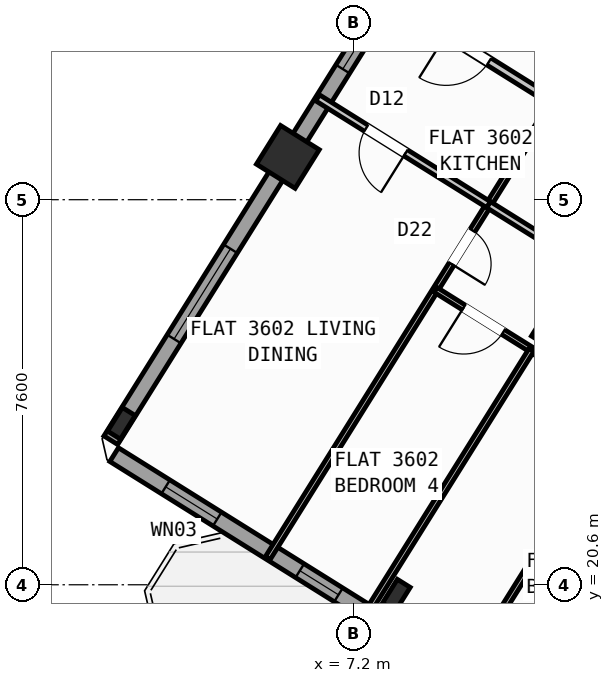
"""IFC4 building model, lengths in metres.
Left out: names, types, materials, properties, quantities, classifications, styles, units other than length and angle.
Written with IfcOpenShell. Run it as: python <this file> out.ifc"""

import sys

from ifc_helpers import new_model, si_unit, direction, frame, frame_2d, origin, origin_2d, place, context, subcontext, project, spatial, rectangle, hollow_rectangle, i_section, extrude, source, transform, mapped, element, fill, save


model = new_model("IFC4")
c1 = context("Model", 3, precision=1e-05, world=origin(), true_north=direction((0.0, 1.0)))
c2 = subcontext(c1, "Body", "Model", "MODEL_VIEW")
j1 = project(units=[si_unit("LENGTHUNIT", "METRE"), si_unit("PLANEANGLEUNIT", "RADIAN")], contexts=[c1])
p1 = place(None, origin())
s1 = spatial("IfcSite", under=j1, at=p1, CompositionType="ELEMENT")
p2 = place(p1, origin())
s2 = spatial("IfcBuilding", under=s1, at=p2, CompositionType="ELEMENT")
p3 = place(p2, frame((0.0, 0.0, 144.3)))
s3 = spatial("IfcBuildingStorey", under=s2, at=p3, CompositionType="ELEMENT", Elevation=144.3)
m1 = source(origin(), c2, "Body", "SweptSolid", [
    extrude(hollow_rectangle(XDim=0.9, YDim=0.9, WallThickness=0.036, at=origin_2d()), origin(), (0.0, 0.0, 1.0), 3.6),
])
p4 = place(p3, frame((11.336, 25.653, 0.0), z_axis=(0.0, 0.0, 1.0), x_axis=(-0.848048096156, 0.529919264233, 0.0)))
e1 = element("IfcColumn", 1, at=p4, inside=s3, PredefinedType="COLUMN", context=c2, shape_type="MappedRepresentation", body=[
    mapped(m1, transform((0.0, 0.0, 0.0), scale=1.0)),
])
m2 = source(origin(), c2, "Body", "SweptSolid", [
    extrude(i_section(OverallWidth=0.3, OverallDepth=0.55, WebThickness=0.015, FlangeThickness=0.029, at=origin_2d()), origin(), (0.0, 0.0, 1.0), 3.6),
])
p5 = place(p3, frame((8.051, 20.395, 0.0), z_axis=(0.0, 0.0, 1.0), x_axis=(-0.848048096156, 0.529919264233, 0.0)))
e2 = element("IfcColumn", 2, at=p5, inside=s3, PredefinedType="COLUMN", context=c2, shape_type="MappedRepresentation", body=[
    mapped(m2, transform((0.0, 0.0, 0.0), scale=1.0)),
])
p6 = place(p3, frame((5.909, 29.044, 0.0), z_axis=(0.0, 0.0, 1.0), x_axis=(-0.848048096156, 0.529919264233, 0.0)))
e3 = element("IfcColumn", 3, at=p6, inside=s3, PredefinedType="COLUMN", context=c2, shape_type="MappedRepresentation", body=[
    mapped(m1, transform((0.0, 0.0, 0.0), scale=1.0)),
])
p7 = place(p3, frame((2.623, 23.786, 0.0), z_axis=(0.0, 0.0, 1.0), x_axis=(-0.848048096156, 0.529919264233, 0.0)))
e4 = element("IfcColumn", 4, at=p7, inside=s3, PredefinedType="COLUMN", context=c2, shape_type="MappedRepresentation", body=[
    mapped(m2, transform((0.0, 0.0, 0.0), scale=1.0)),
])
p8 = place(p3, frame((29.268, 6.429, 0.0), z_axis=(0.0, 0.0, 1.0), x_axis=(-0.848049971435, 0.529916263149, 0.0)))
e5 = element("IfcWall", 5, at=p8, inside=s3, PredefinedType="STANDARD", context=c2, shape_type="SweptSolid", body=[
    extrude(rectangle(XDim=31.588, YDim=0.32, at=frame_2d((15.794, 0.0))), origin(), (0.0, 0.0, 1.0), 3.35),
])
p9 = place(p8, frame((16.362, 0.0, 0.0)))
e6 = element("IfcOpeningElement", 6, at=p9, cuts=e5, PredefinedType="OPENING", context=c2, shape_type="SweptSolid", body=[
    extrude(rectangle(XDim=1.2, YDim=2.15, at=frame_2d((0.6, 1.075))), frame((0.0, 0.17, 0.0), z_axis=(0.0, -1.0, 0.0), x_axis=(1.0, 0.0, 0.0)), (0.0, 0.0, 1.0), 0.34),
])
p10 = place(p8, frame((2.989, 0.0, 0.8)))
e7 = element("IfcOpeningElement", 7, at=p10, cuts=e5, PredefinedType="OPENING", context=c2, shape_type="SweptSolid", body=[
    extrude(rectangle(XDim=2.1, YDim=1.55, at=frame_2d((1.05, 0.775))), frame((0.0, 0.17, 0.0), z_axis=(0.0, -1.0, 0.0), x_axis=(1.0, 0.0, 0.0)), (0.0, 0.0, 1.0), 0.34),
])
p11 = place(p8, frame((8.359, 0.0, 0.8)))
e8 = element("IfcOpeningElement", 8, at=p11, cuts=e5, PredefinedType="OPENING", context=c2, shape_type="SweptSolid", body=[
    extrude(rectangle(XDim=2.1, YDim=1.55, at=frame_2d((1.05, 0.775))), frame((0.0, 0.17, 0.0), z_axis=(0.0, -1.0, 0.0), x_axis=(1.0, 0.0, 0.0)), (0.0, 0.0, 1.0), 0.34),
])
p12 = place(p8, frame((13.284, 0.0, 0.95)))
e9 = element("IfcOpeningElement", 9, at=p12, cuts=e5, PredefinedType="OPENING", context=c2, shape_type="SweptSolid", body=[
    extrude(rectangle(XDim=1.2, YDim=1.4, at=frame_2d((0.6, 0.7))), frame((0.0, 0.17, 0.0), z_axis=(0.0, -1.0, 0.0), x_axis=(1.0, 0.0, 0.0)), (0.0, 0.0, 1.0), 0.34),
])
p13 = place(p8, frame((29.188, 0.0, 0.95)))
e10 = element("IfcOpeningElement", 10, at=p13, cuts=e5, PredefinedType="OPENING", context=c2, shape_type="SweptSolid", body=[
    extrude(rectangle(XDim=1.2, YDim=1.4, at=frame_2d((0.6, 0.7))), frame((0.0, 0.17, 0.0), z_axis=(0.0, -1.0, 0.0), x_axis=(1.0, 0.0, 0.0)), (0.0, 0.0, 1.0), 0.34),
])
p14 = place(p8, frame((19.674, 0.0, 1.0)))
e11 = element("IfcOpeningElement", 11, at=p14, cuts=e5, PredefinedType="OPENING", context=c2, shape_type="SweptSolid", body=[
    extrude(rectangle(XDim=0.9, YDim=1.25, at=frame_2d((0.45, 0.625))), frame((0.0, 0.17, 0.0), z_axis=(0.0, -1.0, 0.0), x_axis=(1.0, 0.0, 0.0)), (0.0, 0.0, 1.0), 0.34),
])
p15 = place(p8, frame((21.896, 0.0, 1.0)))
e12 = element("IfcOpeningElement", 12, at=p15, cuts=e5, PredefinedType="OPENING", context=c2, shape_type="SweptSolid", body=[
    extrude(rectangle(XDim=0.9, YDim=1.25, at=frame_2d((0.45, 0.625))), frame((0.0, 0.17, 0.0), z_axis=(0.0, -1.0, 0.0), x_axis=(1.0, 0.0, 0.0)), (0.0, 0.0, 1.0), 0.34),
])
p16 = place(p8, frame((24.106, 0.0, 1.0)))
e13 = element("IfcOpeningElement", 13, at=p16, cuts=e5, PredefinedType="OPENING", context=c2, shape_type="SweptSolid", body=[
    extrude(rectangle(XDim=0.65, YDim=1.15, at=frame_2d((0.325, 0.575))), frame((0.0, 0.17, 0.0), z_axis=(0.0, -1.0, 0.0), x_axis=(1.0, 0.0, 0.0)), (0.0, 0.0, 1.0), 0.34),
])
p17 = place(p8, frame((26.366, 0.0, 1.0)))
e14 = element("IfcOpeningElement", 14, at=p17, cuts=e5, PredefinedType="OPENING", context=c2, shape_type="SweptSolid", body=[
    extrude(rectangle(XDim=0.9, YDim=1.25, at=frame_2d((0.45, 0.625))), frame((0.0, 0.17, 0.0), z_axis=(0.0, -1.0, 0.0), x_axis=(1.0, 0.0, 0.0)), (0.0, 0.0, 1.0), 0.34),
])
p18 = place(p3, frame((2.415, 23.452, 0.0), z_axis=(0.0, 0.0, 1.0), x_axis=(0.52991049553, 0.848053575387, 0.0)))
e15 = element("IfcWall", 15, at=p18, inside=s3, PredefinedType="STANDARD", context=c2, shape_type="SweptSolid", body=[
    extrude(rectangle(XDim=21.587, YDim=0.32, at=frame_2d((10.794, 0.0))), origin(), (0.0, 0.0, 1.0), 2.775),
])
p19 = place(p18, frame((2.356, 0.0, 0.8)))
e16 = element("IfcOpeningElement", 16, at=p19, cuts=e15, PredefinedType="OPENING", context=c2, shape_type="SweptSolid", body=[
    extrude(rectangle(XDim=2.1, YDim=1.55, at=frame_2d((1.05, 0.775))), frame((0.0, 0.17, 0.0), z_axis=(0.0, -1.0, 0.0), x_axis=(1.0, 0.0, 0.0)), (0.0, 0.0, 1.0), 0.34),
])
p20 = place(p18, frame((8.639, 0.0, 1.0)))
e17 = element("IfcOpeningElement", 17, at=p20, cuts=e15, PredefinedType="OPENING", context=c2, shape_type="SweptSolid", body=[
    extrude(rectangle(XDim=0.9, YDim=1.25, at=frame_2d((0.45, 0.625))), frame((0.0, 0.17, 0.0), z_axis=(0.0, -1.0, 0.0), x_axis=(1.0, 0.0, 0.0)), (0.0, 0.0, 1.0), 0.34),
])
p21 = place(p18, frame((17.744, 0.0, 0.85)))
e18 = element("IfcOpeningElement", 18, at=p21, cuts=e15, PredefinedType="OPENING", context=c2, shape_type="SweptSolid", body=[
    extrude(rectangle(XDim=1.5, YDim=1.5, at=frame_2d((0.75, 0.75))), frame((0.0, 0.17, 0.0), z_axis=(0.0, -1.0, 0.0), x_axis=(1.0, 0.0, 0.0)), (0.0, 0.0, 1.0), 0.34),
])
p22 = place(p3, frame((23.104, 25.256, 0.0), z_axis=(0.0, 0.0, 1.0), x_axis=(-0.848041752158, 0.529929416617, 0.0)))
e19 = element("IfcWall", 19, at=p22, inside=s3, PredefinedType="PARTITIONING", context=c2, shape_type="SweptSolid", body=[
    extrude(rectangle(XDim=16.73, YDim=0.16, at=frame_2d((8.365, 0.0))), origin(), (0.0, 0.0, 1.0), 3.34),
])
p23 = place(p22, frame((2.22, 0.0, 0.0)))
e20 = element("IfcOpeningElement", 20, at=p23, cuts=e19, PredefinedType="OPENING", context=c2, shape_type="SweptSolid", body=[
    extrude(rectangle(XDim=0.86, YDim=2.05, at=frame_2d((0.43, 1.025))), frame((0.0, 0.09, 0.0), z_axis=(0.0, -1.0, 0.0), x_axis=(1.0, 0.0, 0.0)), (0.0, 0.0, 1.0), 0.18),
])
p24 = place(p22, frame((12.084, 0.0, 0.0)))
e21 = element("IfcOpeningElement", 21, at=p24, cuts=e19, PredefinedType="OPENING", context=c2, shape_type="SweptSolid", body=[
    extrude(rectangle(XDim=1.0, YDim=2.1, at=frame_2d((0.5, 1.05))), frame((0.0, 0.09, 0.0), z_axis=(0.0, -1.0, 0.0), x_axis=(1.0, 0.0, 0.0)), (0.0, 0.0, 1.0), 0.18),
])
p25 = place(p3, frame((21.938, 23.391, 0.0), z_axis=(0.0, 0.0, 1.0), x_axis=(-0.848045850158, 0.529922858565, 0.0)))
e22 = element("IfcWall", 22, at=p25, inside=s3, PredefinedType="PARTITIONING", context=c2, shape_type="SweptSolid", body=[
    extrude(rectangle(XDim=16.73, YDim=0.16, at=frame_2d((8.365, 0.0))), origin(), (0.0, 0.0, 1.0), 3.34),
])
p26 = place(p25, frame((2.22, 0.0, 0.0)))
e23 = element("IfcOpeningElement", 23, at=p26, cuts=e22, PredefinedType="OPENING", context=c2, shape_type="SweptSolid", body=[
    extrude(rectangle(XDim=0.86, YDim=2.05, at=frame_2d((0.43, 1.025))), frame((0.0, 0.09, 0.0), z_axis=(0.0, -1.0, 0.0), x_axis=(1.0, 0.0, 0.0)), (0.0, 0.0, 1.0), 0.18),
])
p27 = place(p25, frame((14.22, 0.0, 0.0)))
e24 = element("IfcOpeningElement", 24, at=p27, cuts=e22, PredefinedType="OPENING", context=c2, shape_type="SweptSolid", body=[
    extrude(rectangle(XDim=1.0, YDim=2.1, at=frame_2d((0.5, 1.05))), frame((0.0, 0.09, 0.0), z_axis=(0.0, -1.0, 0.0), x_axis=(1.0, 0.0, 0.0)), (0.0, 0.0, 1.0), 0.18),
])
p28 = place(p3, frame((11.143, 30.136, 0.0), z_axis=(0.0, 0.0, 1.0), x_axis=(-0.529922479612, -0.848046086956, 0.0)))
e25 = element("IfcWall", 25, at=p28, inside=s3, PredefinedType="PARTITIONING", context=c2, shape_type="SweptSolid", body=[
    extrude(rectangle(XDim=10.62, YDim=0.11, at=frame_2d((5.31, 0.0))), origin(), (0.0, 0.0, 1.0), 3.34),
])
p29 = place(p28, frame((3.0, 0.0, 0.0)))
e26 = element("IfcOpeningElement", 26, at=p29, cuts=e25, PredefinedType="OPENING", context=c2, shape_type="SweptSolid", body=[
    extrude(rectangle(XDim=0.78, YDim=2.05, at=frame_2d((0.39, 1.025))), frame((0.0, 0.065, 0.0), z_axis=(0.0, -1.0, 0.0), x_axis=(1.0, 0.0, 0.0)), (0.0, 0.0, 1.0), 0.13),
])
p30 = place(p3, frame((9.871, 28.101, 0.0), z_axis=(0.0, 0.0, 1.0), x_axis=(-0.848025873403, 0.529954826413, 0.0)))
e27 = element("IfcWall", 27, at=p30, inside=s3, PredefinedType="PLUMBINGWALL", context=c2, shape_type="SweptSolid", body=[
    extrude(rectangle(XDim=3.98, YDim=0.14, at=frame_2d((1.99, 0.0))), origin(), (0.0, 0.0, 1.0), 3.34),
])
p31 = place(p30, frame((1.93, 0.0, 0.0)))
e28 = element("IfcOpeningElement", 28, at=p31, cuts=e27, PredefinedType="OPENING", context=c2, shape_type="SweptSolid", body=[
    extrude(rectangle(XDim=0.92, YDim=2.08, at=frame_2d((0.46, 1.04))), frame((0.0, 0.08, 0.0), z_axis=(0.0, -1.0, 0.0), x_axis=(1.0, 0.0, 0.0)), (0.0, 0.0, 1.0), 0.16),
])
p32 = place(p3, frame((17.452, 23.364, 0.0), z_axis=(0.0, 0.0, 1.0), x_axis=(-0.848044326704, 0.52992529657, 0.0)))
e29 = element("IfcWall", 29, at=p32, inside=s3, PredefinedType="PLUMBINGWALL", context=c2, shape_type="SweptSolid", body=[
    extrude(rectangle(XDim=8.94, YDim=0.14, at=frame_2d((4.47, 0.0))), origin(), (0.0, 0.0, 1.0), 3.34),
])
p33 = place(p32, frame((5.087, 0.0, 0.0)))
e30 = element("IfcOpeningElement", 30, at=p33, cuts=e29, PredefinedType="OPENING", context=c2, shape_type="SweptSolid", body=[
    extrude(rectangle(XDim=0.78, YDim=2.05, at=frame_2d((0.39, 1.025))), frame((0.0, 0.08, 0.0), z_axis=(0.0, -1.0, 0.0), x_axis=(1.0, 0.0, 0.0)), (0.0, 0.0, 1.0), 0.16),
])
p34 = place(p32, frame((1.218, 0.0, 0.0)))
e31 = element("IfcOpeningElement", 31, at=p34, cuts=e29, PredefinedType="OPENING", context=c2, shape_type="SweptSolid", body=[
    extrude(rectangle(XDim=0.78, YDim=2.05, at=frame_2d((0.39, 1.025))), frame((0.0, 0.08, 0.0), z_axis=(0.0, -1.0, 0.0), x_axis=(1.0, 0.0, 0.0)), (0.0, 0.0, 1.0), 0.16),
])
p35 = place(p3, frame((16.403, 21.685, 0.0), z_axis=(0.0, 0.0, 1.0), x_axis=(-0.848044326704, 0.52992529657, 0.0)))
e32 = element("IfcWall", 32, at=p35, inside=s3, PredefinedType="PARTITIONING", context=c2, shape_type="SweptSolid", body=[
    extrude(rectangle(XDim=8.94, YDim=0.11, at=frame_2d((4.47, 0.0))), origin(), (0.0, 0.0, 1.0), 3.34),
])
p36 = place(p35, frame((0.657, 0.0, 0.0)))
e33 = element("IfcOpeningElement", 33, at=p36, cuts=e32, PredefinedType="OPENING", context=c2, shape_type="SweptSolid", body=[
    extrude(rectangle(XDim=0.92, YDim=2.08, at=frame_2d((0.46, 1.04))), frame((0.0, 0.065, 0.0), z_axis=(0.0, -1.0, 0.0), x_axis=(1.0, 0.0, 0.0)), (0.0, 0.0, 1.0), 0.13),
])
p37 = place(p35, frame((2.893, 0.0, 0.0)))
e34 = element("IfcOpeningElement", 34, at=p37, cuts=e32, PredefinedType="OPENING", context=c2, shape_type="SweptSolid", body=[
    extrude(rectangle(XDim=0.92, YDim=2.08, at=frame_2d((0.46, 1.04))), frame((0.0, 0.065, 0.0), z_axis=(0.0, -1.0, 0.0), x_axis=(1.0, 0.0, 0.0)), (0.0, 0.0, 1.0), 0.13),
])
p38 = place(p35, frame((5.008, 0.0, 0.0)))
e35 = element("IfcOpeningElement", 35, at=p38, cuts=e32, PredefinedType="OPENING", context=c2, shape_type="SweptSolid", body=[
    extrude(rectangle(XDim=0.92, YDim=2.08, at=frame_2d((0.46, 1.04))), frame((0.0, 0.065, 0.0), z_axis=(0.0, -1.0, 0.0), x_axis=(1.0, 0.0, 0.0)), (0.0, 0.0, 1.0), 0.13),
])
p39 = place(p35, frame((7.363, 0.0, 0.0)))
e36 = element("IfcOpeningElement", 36, at=p39, cuts=e32, PredefinedType="OPENING", context=c2, shape_type="SweptSolid", body=[
    extrude(rectangle(XDim=0.92, YDim=2.08, at=frame_2d((0.46, 1.04))), frame((0.0, 0.065, 0.0), z_axis=(0.0, -1.0, 0.0), x_axis=(1.0, 0.0, 0.0)), (0.0, 0.0, 1.0), 0.13),
])
p40 = place(p3, frame((12.613, 24.053, 0.0), z_axis=(0.0, 0.0, 1.0), x_axis=(-0.529900466106, -0.848059842241, 0.0)))
e37 = element("IfcWall", 37, at=p40, inside=s3, PredefinedType="PARTITIONING", context=c2, shape_type="SweptSolid", body=[
    extrude(rectangle(XDim=6.24, YDim=0.11, at=frame_2d((3.12, 0.0))), origin(), (0.0, 0.0, 1.0), 2.995),
])
p41 = place(p3, frame((10.717, 25.238, 0.0), z_axis=(0.0, 0.0, 1.0), x_axis=(-0.52991804857, -0.848048855786, 0.0)))
e38 = element("IfcWall", 38, at=p41, inside=s3, PredefinedType="PARTITIONING", context=c2, shape_type="SweptSolid", body=[
    extrude(rectangle(XDim=6.24, YDim=0.11, at=frame_2d((3.12, 0.0))), origin(), (0.0, 0.0, 1.0), 3.34),
])
m3 = source(origin(), c2, "Body", "SweptSolid", [
    extrude(rectangle(XDim=1.2, YDim=1.4, at=frame_2d((0.6, 0.7))), frame((0.0, 0.03, 0.0), z_axis=(0.0, -1.0, 0.0), x_axis=(1.0, 0.0, 0.0)), (0.0, 0.0, 1.0), 0.06),
])
p42 = place(p13, origin())
e39 = element("IfcWindow", 39, at=p42, inside=s3, PartitioningType="SINGLE_PANEL", PredefinedType="WINDOW", context=c2, shape_type="MappedRepresentation", body=[
    mapped(m3, transform((0.0, 0.0, 0.0), scale=1.0)),
])
fill(e10, e39)
m4 = source(origin(), c2, "Body", "SweptSolid", [
    extrude(rectangle(XDim=2.1, YDim=1.55, at=frame_2d((1.05, 0.775))), frame((0.0, 0.03, 0.0), z_axis=(0.0, -1.0, 0.0), x_axis=(1.0, 0.0, 0.0)), (0.0, 0.0, 1.0), 0.06),
])
p43 = place(p19, origin())
e40 = element("IfcWindow", 40, at=p43, inside=s3, PartitioningType="SINGLE_PANEL", PredefinedType="WINDOW", context=c2, shape_type="MappedRepresentation", body=[
    mapped(m4, transform((0.0, 0.0, 0.0), scale=1.0)),
])
fill(e16, e40)
m5 = source(origin(), c2, "Body", "SweptSolid", [
    extrude(rectangle(XDim=0.9, YDim=1.25, at=frame_2d((0.45, 0.625))), frame((0.0, 0.03, 0.0), z_axis=(0.0, -1.0, 0.0), x_axis=(1.0, 0.0, 0.0)), (0.0, 0.0, 1.0), 0.06),
])
p44 = place(p20, origin())
e41 = element("IfcWindow", 41, at=p44, inside=s3, PartitioningType="SINGLE_PANEL", PredefinedType="WINDOW", context=c2, shape_type="MappedRepresentation", body=[
    mapped(m5, transform((0.0, 0.0, 0.0), scale=1.0)),
])
fill(e17, e41)
p45 = place(p17, origin())
e42 = element("IfcWindow", 42, at=p45, inside=s3, PartitioningType="SINGLE_PANEL", PredefinedType="WINDOW", context=c2, shape_type="MappedRepresentation", body=[
    mapped(m5, transform((0.0, 0.0, 0.0), scale=1.0)),
])
fill(e14, e42)
m6 = source(origin(), c2, "Body", "SweptSolid", [
    extrude(rectangle(XDim=1.0, YDim=2.1, at=frame_2d((0.5, 1.05))), frame((0.0, 0.025, 0.0), z_axis=(0.0, -1.0, 0.0), x_axis=(1.0, 0.0, 0.0)), (0.0, 0.0, 1.0), 0.05),
])
p46 = place(p27, origin())
e43 = element("IfcDoor", 43, at=p46, inside=s3, OperationType="SINGLE_SWING_RIGHT", PredefinedType="DOOR", context=c2, shape_type="MappedRepresentation", body=[
    mapped(m6, transform((0.0, 0.0, 0.0), scale=1.0)),
])
fill(e24, e43)
m7 = source(origin(), c2, "Body", "SweptSolid", [
    extrude(rectangle(XDim=0.92, YDim=2.08, at=frame_2d((0.46, 1.04))), frame((0.0, 0.025, 0.0), z_axis=(0.0, -1.0, 0.0), x_axis=(1.0, 0.0, 0.0)), (0.0, 0.0, 1.0), 0.05),
])
p47 = place(p31, origin())
e44 = element("IfcDoor", 44, at=p47, inside=s3, OperationType="SINGLE_SWING_LEFT", PredefinedType="DOOR", context=c2, shape_type="MappedRepresentation", body=[
    mapped(m7, transform((0.0, 0.0, 0.0), scale=1.0)),
])
fill(e28, e44)
m8 = source(origin(), c2, "Body", "SweptSolid", [
    extrude(rectangle(XDim=0.78, YDim=2.05, at=frame_2d((0.39, 1.025))), frame((0.0, 0.025, 0.0), z_axis=(0.0, -1.0, 0.0), x_axis=(1.0, 0.0, 0.0)), (0.0, 0.0, 1.0), 0.05),
])
p48 = place(p29, origin())
e45 = element("IfcDoor", 45, at=p48, inside=s3, OperationType="SINGLE_SWING_RIGHT", PredefinedType="DOOR", context=c2, shape_type="MappedRepresentation", body=[
    mapped(m8, transform((0.0, 0.0, 0.0), scale=1.0)),
])
fill(e26, e45)
p49 = place(p39, origin())
e46 = element("IfcDoor", 46, at=p49, inside=s3, OperationType="SINGLE_SWING_RIGHT", PredefinedType="DOOR", context=c2, shape_type="MappedRepresentation", body=[
    mapped(m7, transform((0.0, 0.0, 0.0), scale=1.0)),
])
fill(e36, e46)
save(model, sys.argv[1])
